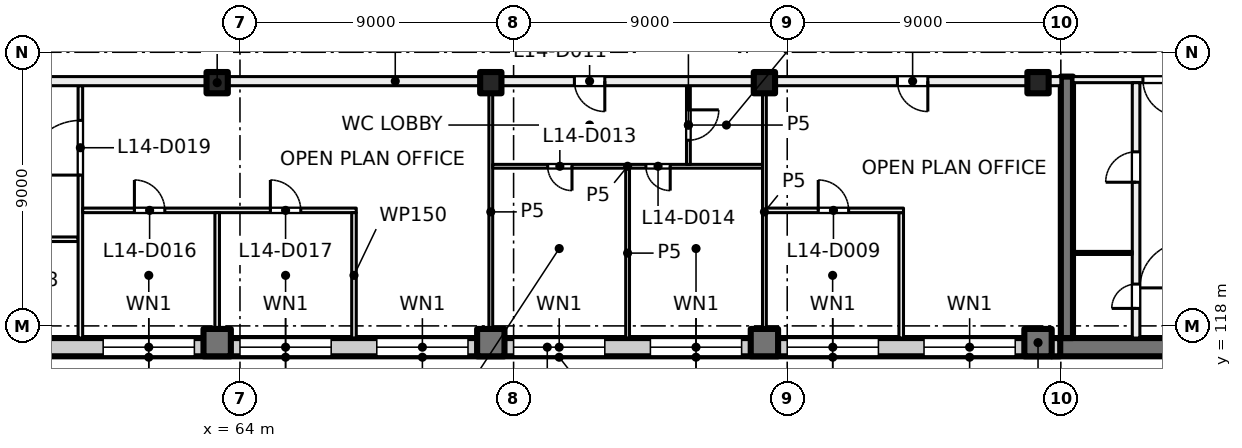
"""IFC4 building model, lengths in metres.
Left out: names, types, materials, properties, quantities, classifications, styles, units other than length and angle.
Written with IfcOpenShell. Run it as: python <this file> out.ifc"""

import sys

from ifc_helpers import new_model, si_unit, direction, frame, frame_2d, origin, origin_2d, place, context, subcontext, project, spatial, rectangle, extrude, element, fill, save


model = new_model("IFC4")
c1 = context("Model", 3, precision=1e-05, world=origin(), true_north=direction((0.0, 1.0)))
c2 = subcontext(c1, "Body", "Model", "MODEL_VIEW")
j1 = project(units=[si_unit("LENGTHUNIT", "METRE"), si_unit("PLANEANGLEUNIT", "RADIAN")], contexts=[c1])
p1 = place(None, origin())
s1 = spatial("IfcSite", under=j1, at=p1, CompositionType="ELEMENT")
p2 = place(p1, origin())
s2 = spatial("IfcBuilding", under=s1, at=p2, CompositionType="ELEMENT")
p3 = place(p2, frame((0.0, 0.0, 63.5)))
s3 = spatial("IfcBuildingStorey", under=s2, at=p3, CompositionType="ELEMENT", Elevation=63.5)
for number, where, z_axis, x_axis in (
    (1, (63.25, 126.0, 0.0), (0.0, 0.0, 1.0), (1.0, 0.0, 0.0)),
    (2, (72.25, 126.0, 0.0), (0.0, 0.0, 1.0), (1.0, 0.0, 0.0)),
    (3, (81.25, 126.0, 0.0), (0.0, 0.0, 1.0), (1.0, 0.0, 0.0)),
    (4, (90.25, 126.0, 0.0), (0.0, 0.0, 1.0), (1.0, 0.0, 0.0)),
):
    element("IfcColumn", number, at=place(p3, frame(where, z_axis=z_axis, x_axis=x_axis)), inside=s3, PredefinedType="COLUMN", context=c2, shape_type="SweptSolid", body=[
        extrude(rectangle(XDim=0.7, YDim=0.7, at=origin_2d()), origin(), (0.0, 0.0, 1.0), 4.0),
    ])
for number, where, z_axis, x_axis in (
    (5, (63.25, 117.45, 0.0), (0.0, 0.0, 1.0), (1.0, 0.0, 0.0)),
    (6, (72.25, 117.45, 0.0), (0.0, 0.0, 1.0), (1.0, 0.0, 0.0)),
    (7, (81.25, 117.45, 0.0), (0.0, 0.0, 1.0), (1.0, 0.0, 0.0)),
    (8, (90.25, 117.45, 0.0), (0.0, 0.0, 1.0), (1.0, 0.0, 0.0)),
):
    element("IfcColumn", number, at=place(p3, frame(where, z_axis=z_axis, x_axis=x_axis)), inside=s3, PredefinedType="COLUMN", context=c2, shape_type="SweptSolid", body=[
        extrude(rectangle(XDim=0.9, YDim=0.9, at=origin_2d()), origin(), (0.0, 0.0, 1.0), 4.0),
    ])
p4 = place(p3, frame((99.6, 117.3, 0.0), z_axis=(0.0, 0.0, 1.0), x_axis=(-1.0, 0.0, 0.0)))
e9 = element("IfcWall", 9, at=p4, inside=s3, PredefinedType="SHEAR", context=c2, shape_type="SweptSolid", body=[
    extrude(rectangle(XDim=8.9, YDim=0.6, at=frame_2d((4.45, 0.0))), origin(), (0.0, 0.0, 1.0), 4.0),
])
p5 = place(p3, frame((91.2, 126.2, 0.0), z_axis=(0.0, 0.0, 1.0), x_axis=(0.0, -1.0, 0.0)))
e10 = element("IfcWall", 10, at=p5, inside=s3, PredefinedType="SHEAR", context=c2, shape_type="SweptSolid", body=[
    extrude(rectangle(XDim=8.6, YDim=0.4, at=frame_2d((4.3, 0.0))), origin(), (0.0, 0.0, 1.0), 4.0),
])
p6 = place(p3, frame((90.98, 117.3, 0.0), z_axis=(0.0, 0.0, 1.0), x_axis=(-1.0, 0.0, 0.0)))
e11 = element("IfcWall", 11, at=p6, inside=s3, PredefinedType="SOLIDWALL", context=c2, shape_type="SweptSolid", body=[
    extrude(rectangle(XDim=33.745, YDim=0.6, at=frame_2d((16.873, 0.0))), origin(), (0.0, 0.0, 1.0), 3.625),
])
p7 = place(p6, frame((1.48, 0.0, 0.9)))
e12 = element("IfcOpeningElement", 12, at=p7, cuts=e11, PredefinedType="OPENING", context=c2, shape_type="SweptSolid", body=[
    extrude(rectangle(XDim=3.0, YDim=2.4, at=frame_2d((1.5, 1.2))), frame((0.0, 0.31, 0.0), z_axis=(0.0, -1.0, 0.0), x_axis=(1.0, 0.0, 0.0)), (0.0, 0.0, 1.0), 0.62),
])
p8 = place(p6, frame((5.98, 0.0, 0.9)))
e13 = element("IfcOpeningElement", 13, at=p8, cuts=e11, PredefinedType="OPENING", context=c2, shape_type="SweptSolid", body=[
    extrude(rectangle(XDim=3.0, YDim=2.4, at=frame_2d((1.5, 1.2))), frame((0.0, 0.31, 0.0), z_axis=(0.0, -1.0, 0.0), x_axis=(1.0, 0.0, 0.0)), (0.0, 0.0, 1.0), 0.62),
])
p9 = place(p6, frame((10.48, 0.0, 0.9)))
e14 = element("IfcOpeningElement", 14, at=p9, cuts=e11, PredefinedType="OPENING", context=c2, shape_type="SweptSolid", body=[
    extrude(rectangle(XDim=3.0, YDim=2.4, at=frame_2d((1.5, 1.2))), frame((0.0, 0.31, 0.0), z_axis=(0.0, -1.0, 0.0), x_axis=(1.0, 0.0, 0.0)), (0.0, 0.0, 1.0), 0.62),
])
p10 = place(p6, frame((14.98, 0.0, 0.9)))
e15 = element("IfcOpeningElement", 15, at=p10, cuts=e11, PredefinedType="OPENING", context=c2, shape_type="SweptSolid", body=[
    extrude(rectangle(XDim=3.0, YDim=2.4, at=frame_2d((1.5, 1.2))), frame((0.0, 0.31, 0.0), z_axis=(0.0, -1.0, 0.0), x_axis=(1.0, 0.0, 0.0)), (0.0, 0.0, 1.0), 0.62),
])
p11 = place(p6, frame((19.48, 0.0, 0.9)))
e16 = element("IfcOpeningElement", 16, at=p11, cuts=e11, PredefinedType="OPENING", context=c2, shape_type="SweptSolid", body=[
    extrude(rectangle(XDim=3.0, YDim=2.4, at=frame_2d((1.5, 1.2))), frame((0.0, 0.31, 0.0), z_axis=(0.0, -1.0, 0.0), x_axis=(1.0, 0.0, 0.0)), (0.0, 0.0, 1.0), 0.62),
])
p12 = place(p6, frame((23.98, 0.0, 0.9)))
e17 = element("IfcOpeningElement", 17, at=p12, cuts=e11, PredefinedType="OPENING", context=c2, shape_type="SweptSolid", body=[
    extrude(rectangle(XDim=3.0, YDim=2.4, at=frame_2d((1.5, 1.2))), frame((0.0, 0.31, 0.0), z_axis=(0.0, -1.0, 0.0), x_axis=(1.0, 0.0, 0.0)), (0.0, 0.0, 1.0), 0.62),
])
p13 = place(p6, frame((28.48, 0.0, 0.9)))
e18 = element("IfcOpeningElement", 18, at=p13, cuts=e11, PredefinedType="OPENING", context=c2, shape_type="SweptSolid", body=[
    extrude(rectangle(XDim=3.0, YDim=2.4, at=frame_2d((1.5, 1.2))), frame((0.0, 0.31, 0.0), z_axis=(0.0, -1.0, 0.0), x_axis=(1.0, 0.0, 0.0)), (0.0, 0.0, 1.0), 0.62),
])
p14 = place(p3, frame((95.2, 126.1, 0.0), z_axis=(0.0, 0.0, 1.0), x_axis=(-1.0, 0.0, 0.0)))
e19 = element("IfcWall", 19, at=p14, inside=s3, PredefinedType="PARTITIONING", context=c2, shape_type="SweptSolid", body=[
    extrude(rectangle(XDim=3.8, YDim=0.2, at=frame_2d((1.9, 0.0))), origin(), (0.0, 0.0, 1.0), 3.625),
])
p15 = place(p14, frame((0.3, 0.0, 0.0)))
e20 = element("IfcOpeningElement", 20, at=p15, cuts=e19, PredefinedType="OPENING", context=c2, shape_type="SweptSolid", body=[
    extrude(rectangle(XDim=1.2, YDim=2.1, at=frame_2d((0.6, 1.05))), frame((0.0, 0.11, 0.0), z_axis=(0.0, -1.0, 0.0), x_axis=(1.0, 0.0, 0.0)), (0.0, 0.0, 1.0), 0.22),
])
p16 = place(p3, frame((93.475, 117.6, 0.0), z_axis=(0.0, 0.0, 1.0), x_axis=(0.0, 1.0, 0.0)))
e21 = element("IfcWall", 21, at=p16, inside=s3, PredefinedType="PARTITIONING", context=c2, shape_type="SweptSolid", body=[
    extrude(rectangle(XDim=8.4, YDim=0.25, at=frame_2d((4.2, 0.0))), origin(), (0.0, 0.0, 1.0), 3.625),
])
p17 = place(p16, frame((5.125, 0.0, 0.0)))
e22 = element("IfcOpeningElement", 22, at=p17, cuts=e21, PredefinedType="OPENING", context=c2, shape_type="SweptSolid", body=[
    extrude(rectangle(XDim=1.0, YDim=2.1, at=frame_2d((0.5, 1.05))), frame((0.0, 0.135, 0.0), z_axis=(0.0, -1.0, 0.0), x_axis=(1.0, 0.0, 0.0)), (0.0, 0.0, 1.0), 0.27),
])
p18 = place(p16, frame((0.975, 0.0, 0.0)))
e23 = element("IfcOpeningElement", 23, at=p18, cuts=e21, PredefinedType="OPENING", context=c2, shape_type="SweptSolid", body=[
    extrude(rectangle(XDim=0.8, YDim=2.1, at=frame_2d((0.4, 1.05))), frame((0.0, 0.135, 0.0), z_axis=(0.0, -1.0, 0.0), x_axis=(1.0, 0.0, 0.0)), (0.0, 0.0, 1.0), 0.27),
])
p19 = place(p3, frame((93.35, 120.4, 0.0), z_axis=(0.0, 0.0, 1.0), x_axis=(-1.0, 0.0, 0.0)))
e24 = element("IfcWall", 24, at=p19, inside=s3, PredefinedType="PARTITIONING", context=c2, shape_type="SweptSolid", body=[
    extrude(rectangle(XDim=1.95, YDim=0.1, at=frame_2d((0.975, 0.0))), origin(), (0.0, 0.0, 1.0), 3.625),
])
p20 = place(p3, frame((54.325, 120.85, 0.0), z_axis=(0.0, 0.0, 1.0), x_axis=(1.0, 0.0, 0.0)))
e25 = element("IfcWall", 25, at=p20, inside=s3, PredefinedType="PARTITIONING", context=c2, shape_type="SweptSolid", body=[
    extrude(rectangle(XDim=4.35, YDim=0.15, at=frame_2d((2.175, 0.0))), origin(), (0.0, 0.0, 1.0), 3.625),
])
p21 = place(p20, frame((1.675, 0.0, 0.0)))
e26 = element("IfcOpeningElement", 26, at=p21, cuts=e25, PredefinedType="OPENING", context=c2, shape_type="SweptSolid", body=[
    extrude(rectangle(XDim=1.0, YDim=2.1, at=frame_2d((0.5, 1.05))), frame((0.0, 0.085, 0.0), z_axis=(0.0, -1.0, 0.0), x_axis=(1.0, 0.0, 0.0)), (0.0, 0.0, 1.0), 0.17),
])
p22 = place(p3, frame((58.75, 117.6, 0.0), z_axis=(0.0, 0.0, 1.0), x_axis=(0.0, 1.0, 0.0)))
e27 = element("IfcWall", 27, at=p22, inside=s3, PredefinedType="PARTITIONING", context=c2, shape_type="SweptSolid", body=[
    extrude(rectangle(XDim=8.3, YDim=0.15, at=frame_2d((4.15, 0.0))), origin(), (0.0, 0.0, 1.0), 3.625),
])
p23 = place(p22, frame((5.36, 0.0, 0.0)))
e28 = element("IfcOpeningElement", 28, at=p23, cuts=e27, PredefinedType="OPENING", context=c2, shape_type="SweptSolid", body=[
    extrude(rectangle(XDim=1.8, YDim=2.1, at=frame_2d((0.9, 1.05))), frame((0.0, 0.085, 0.0), z_axis=(0.0, -1.0, 0.0), x_axis=(1.0, 0.0, 0.0)), (0.0, 0.0, 1.0), 0.17),
])
p24 = place(p3, frame((58.825, 121.8, 0.0), z_axis=(0.0, 0.0, 1.0), x_axis=(1.0, 0.0, 0.0)))
e29 = element("IfcWall", 29, at=p24, inside=s3, PredefinedType="PARTITIONING", context=c2, shape_type="SweptSolid", body=[
    extrude(rectangle(XDim=9.0, YDim=0.15, at=frame_2d((4.5, 0.0))), origin(), (0.0, 0.0, 1.0), 3.625),
])
p25 = place(p24, frame((1.702, 0.0, 0.0)))
e30 = element("IfcOpeningElement", 30, at=p25, cuts=e29, PredefinedType="OPENING", context=c2, shape_type="SweptSolid", body=[
    extrude(rectangle(XDim=1.0, YDim=2.1, at=frame_2d((0.5, 1.05))), frame((0.0, 0.085, 0.0), z_axis=(0.0, -1.0, 0.0), x_axis=(1.0, 0.0, 0.0)), (0.0, 0.0, 1.0), 0.17),
])
p26 = place(p24, frame((6.175, 0.0, 0.0)))
e31 = element("IfcOpeningElement", 31, at=p26, cuts=e29, PredefinedType="OPENING", context=c2, shape_type="SweptSolid", body=[
    extrude(rectangle(XDim=1.0, YDim=2.1, at=frame_2d((0.5, 1.05))), frame((0.0, 0.085, 0.0), z_axis=(0.0, -1.0, 0.0), x_axis=(1.0, 0.0, 0.0)), (0.0, 0.0, 1.0), 0.17),
])
for number, where, z_axis, x_axis in (
    (32, (63.25, 121.725, 0.0), (0.0, 0.0, 1.0), (0.0, -1.0, 0.0)),
    (33, (67.75, 117.6, 0.0), (0.0, 0.0, 1.0), (0.0, 1.0, 0.0)),
):
    element("IfcWall", number, at=place(p3, frame(where, z_axis=z_axis, x_axis=x_axis)), inside=s3, PredefinedType="PARTITIONING", context=c2, shape_type="SweptSolid", body=[
        extrude(rectangle(XDim=4.125, YDim=0.15, at=frame_2d((2.062, 0.0))), origin(), (0.0, 0.0, 1.0), 3.625),
    ])
p27 = place(p3, frame((72.25, 117.6, 0.0), z_axis=(0.0, 0.0, 1.0), x_axis=(0.0, 1.0, 0.0)))
e34 = element("IfcWall", 34, at=p27, inside=s3, PredefinedType="PARTITIONING", context=c2, shape_type="SweptSolid", body=[
    extrude(rectangle(XDim=8.3, YDim=0.125, at=frame_2d((4.15, 0.0))), origin(), (0.0, 0.0, 1.0), 3.625),
])
p28 = place(p3, frame((81.188, 123.25, 0.0), z_axis=(0.0, 0.0, 1.0), x_axis=(-1.0, 0.0, 0.0)))
e35 = element("IfcWall", 35, at=p28, inside=s3, PredefinedType="PARTITIONING", context=c2, shape_type="SweptSolid", body=[
    extrude(rectangle(XDim=8.876, YDim=0.125, at=frame_2d((4.438, 0.0))), origin(), (0.0, 0.0, 1.0), 3.625),
])
p29 = place(p28, frame((6.267, 0.0, 0.0)))
e36 = element("IfcOpeningElement", 36, at=p29, cuts=e35, PredefinedType="OPENING", context=c2, shape_type="SweptSolid", body=[
    extrude(rectangle(XDim=0.8, YDim=2.1, at=frame_2d((0.4, 1.05))), frame((0.0, 0.073, 0.0), z_axis=(0.0, -1.0, 0.0), x_axis=(1.0, 0.0, 0.0)), (0.0, 0.0, 1.0), 0.145),
])
p30 = place(p28, frame((3.037, 0.0, 0.0)))
e37 = element("IfcOpeningElement", 37, at=p30, cuts=e35, PredefinedType="OPENING", context=c2, shape_type="SweptSolid", body=[
    extrude(rectangle(XDim=0.8, YDim=2.1, at=frame_2d((0.4, 1.05))), frame((0.0, 0.073, 0.0), z_axis=(0.0, -1.0, 0.0), x_axis=(1.0, 0.0, 0.0)), (0.0, 0.0, 1.0), 0.145),
])
p31 = place(p3, frame((76.75, 117.6, 0.0), z_axis=(0.0, 0.0, 1.0), x_axis=(0.0, 1.0, 0.0)))
e38 = element("IfcWall", 38, at=p31, inside=s3, PredefinedType="PARTITIONING", context=c2, shape_type="SweptSolid", body=[
    extrude(rectangle(XDim=5.588, YDim=0.125, at=frame_2d((2.794, 0.0))), origin(), (0.0, 0.0, 1.0), 3.625),
])
p32 = place(p3, frame((78.75, 125.9, 0.0), z_axis=(0.0, 0.0, 1.0), x_axis=(0.0, -1.0, 0.0)))
e39 = element("IfcWall", 39, at=p32, inside=s3, PredefinedType="PARTITIONING", context=c2, shape_type="SweptSolid", body=[
    extrude(rectangle(XDim=2.588, YDim=0.125, at=frame_2d((1.294, 0.0))), origin(), (0.0, 0.0, 1.0), 3.625),
])
p33 = place(p32, frame((0.794, 0.0, 0.0)))
e40 = element("IfcOpeningElement", 40, at=p33, cuts=e39, PredefinedType="OPENING", context=c2, shape_type="SweptSolid", body=[
    extrude(rectangle(XDim=1.0, YDim=2.1, at=frame_2d((0.5, 1.05))), frame((0.0, 0.073, 0.0), z_axis=(0.0, -1.0, 0.0), x_axis=(1.0, 0.0, 0.0)), (0.0, 0.0, 1.0), 0.145),
])
p34 = place(p3, frame((81.25, 117.6, 0.0), z_axis=(0.0, 0.0, 1.0), x_axis=(0.0, 1.0, 0.0)))
e41 = element("IfcWall", 41, at=p34, inside=s3, PredefinedType="PARTITIONING", context=c2, shape_type="SweptSolid", body=[
    extrude(rectangle(XDim=8.3, YDim=0.125, at=frame_2d((4.15, 0.0))), origin(), (0.0, 0.0, 1.0), 3.625),
])
p35 = place(p3, frame((85.75, 117.6, 0.0), z_axis=(0.0, 0.0, 1.0), x_axis=(0.0, 1.0, 0.0)))
e42 = element("IfcWall", 42, at=p35, inside=s3, PredefinedType="PARTITIONING", context=c2, shape_type="SweptSolid", body=[
    extrude(rectangle(XDim=4.125, YDim=0.15, at=frame_2d((2.062, 0.0))), origin(), (0.0, 0.0, 1.0), 3.625),
])
p36 = place(p3, frame((81.312, 121.8, 0.0), z_axis=(0.0, 0.0, 1.0), x_axis=(1.0, 0.0, 0.0)))
e43 = element("IfcWall", 43, at=p36, inside=s3, PredefinedType="PARTITIONING", context=c2, shape_type="SweptSolid", body=[
    extrude(rectangle(XDim=4.513, YDim=0.15, at=frame_2d((2.256, 0.0))), origin(), (0.0, 0.0, 1.0), 3.625),
])
p37 = place(p36, frame((1.709, 0.0, 0.0)))
e44 = element("IfcOpeningElement", 44, at=p37, cuts=e43, PredefinedType="OPENING", context=c2, shape_type="SweptSolid", body=[
    extrude(rectangle(XDim=1.0, YDim=2.1, at=frame_2d((0.5, 1.05))), frame((0.0, 0.085, 0.0), z_axis=(0.0, -1.0, 0.0), x_axis=(1.0, 0.0, 0.0)), (0.0, 0.0, 1.0), 0.17),
])
p38 = place(p3, frame((91.0, 126.05, 0.0), z_axis=(0.0, 0.0, 1.0), x_axis=(-1.0, 0.0, 0.0)))
e45 = element("IfcWall", 45, at=p38, inside=s3, PredefinedType="PARTITIONING", context=c2, shape_type="SweptSolid", body=[
    extrude(rectangle(XDim=43.785, YDim=0.3, at=frame_2d((21.893, 0.0))), origin(), (0.0, 0.0, 1.0), 3.625),
])
p39 = place(p38, frame((4.375, 0.0, 0.0)))
e46 = element("IfcOpeningElement", 46, at=p39, cuts=e45, PredefinedType="OPENING", context=c2, shape_type="SweptSolid", body=[
    extrude(rectangle(XDim=1.0, YDim=2.1, at=frame_2d((0.5, 1.05))), frame((0.0, 0.16, 0.0), z_axis=(0.0, -1.0, 0.0), x_axis=(1.0, 0.0, 0.0)), (0.0, 0.0, 1.0), 0.32),
])
p40 = place(p38, frame((15.0, 0.0, 0.0)))
e47 = element("IfcOpeningElement", 47, at=p40, cuts=e45, PredefinedType="OPENING", context=c2, shape_type="SweptSolid", body=[
    extrude(rectangle(XDim=1.0, YDim=2.1, at=frame_2d((0.5, 1.05))), frame((0.0, 0.16, 0.0), z_axis=(0.0, -1.0, 0.0), x_axis=(1.0, 0.0, 0.0)), (0.0, 0.0, 1.0), 0.32),
])
p41 = place(p38, frame((34.0, 0.0, 0.0)))
e48 = element("IfcOpeningElement", 48, at=p41, cuts=e45, PredefinedType="OPENING", context=c2, shape_type="SweptSolid", body=[
    extrude(rectangle(XDim=1.0, YDim=2.1, at=frame_2d((0.5, 1.05))), frame((0.0, 0.16, 0.0), z_axis=(0.0, -1.0, 0.0), x_axis=(1.0, 0.0, 0.0)), (0.0, 0.0, 1.0), 0.32),
])
p42 = place(p38, frame((39.296, 0.0, 0.0)))
e49 = element("IfcOpeningElement", 49, at=p42, cuts=e45, PredefinedType="OPENING", context=c2, shape_type="SweptSolid", body=[
    extrude(rectangle(XDim=1.8, YDim=2.1, at=frame_2d((0.9, 1.05))), frame((0.0, 0.16, 0.0), z_axis=(0.0, -1.0, 0.0), x_axis=(1.0, 0.0, 0.0)), (0.0, 0.0, 1.0), 0.32),
])
p43 = place(p7, origin())
e50 = element("IfcWindow", 50, at=p43, inside=s3, PartitioningType="SINGLE_PANEL", PredefinedType="WINDOW", context=c2, shape_type="SweptSolid", body=[
    extrude(rectangle(XDim=3.0, YDim=2.4, at=frame_2d((1.5, 1.2))), frame((0.0, 0.03, 0.0), z_axis=(0.0, -1.0, 0.0), x_axis=(1.0, 0.0, 0.0)), (0.0, 0.0, 1.0), 0.06),
])
fill(e12, e50)
p44 = place(p8, origin())
e51 = element("IfcWindow", 51, at=p44, inside=s3, PartitioningType="SINGLE_PANEL", PredefinedType="WINDOW", context=c2, shape_type="SweptSolid", body=[
    extrude(rectangle(XDim=3.0, YDim=2.4, at=frame_2d((1.5, 1.2))), frame((0.0, 0.03, 0.0), z_axis=(0.0, -1.0, 0.0), x_axis=(1.0, 0.0, 0.0)), (0.0, 0.0, 1.0), 0.06),
])
fill(e13, e51)
p45 = place(p9, origin())
e52 = element("IfcWindow", 52, at=p45, inside=s3, PartitioningType="SINGLE_PANEL", PredefinedType="WINDOW", context=c2, shape_type="SweptSolid", body=[
    extrude(rectangle(XDim=3.0, YDim=2.4, at=frame_2d((1.5, 1.2))), frame((0.0, 0.03, 0.0), z_axis=(0.0, -1.0, 0.0), x_axis=(1.0, 0.0, 0.0)), (0.0, 0.0, 1.0), 0.06),
])
fill(e14, e52)
p46 = place(p10, origin())
e53 = element("IfcWindow", 53, at=p46, inside=s3, PartitioningType="SINGLE_PANEL", PredefinedType="WINDOW", context=c2, shape_type="SweptSolid", body=[
    extrude(rectangle(XDim=3.0, YDim=2.4, at=frame_2d((1.5, 1.2))), frame((0.0, 0.03, 0.0), z_axis=(0.0, -1.0, 0.0), x_axis=(1.0, 0.0, 0.0)), (0.0, 0.0, 1.0), 0.06),
])
fill(e15, e53)
p47 = place(p11, origin())
e54 = element("IfcWindow", 54, at=p47, inside=s3, PartitioningType="SINGLE_PANEL", PredefinedType="WINDOW", context=c2, shape_type="SweptSolid", body=[
    extrude(rectangle(XDim=3.0, YDim=2.4, at=frame_2d((1.5, 1.2))), frame((0.0, 0.03, 0.0), z_axis=(0.0, -1.0, 0.0), x_axis=(1.0, 0.0, 0.0)), (0.0, 0.0, 1.0), 0.06),
])
fill(e16, e54)
p48 = place(p12, origin())
e55 = element("IfcWindow", 55, at=p48, inside=s3, PartitioningType="SINGLE_PANEL", PredefinedType="WINDOW", context=c2, shape_type="SweptSolid", body=[
    extrude(rectangle(XDim=3.0, YDim=2.4, at=frame_2d((1.5, 1.2))), frame((0.0, 0.03, 0.0), z_axis=(0.0, -1.0, 0.0), x_axis=(1.0, 0.0, 0.0)), (0.0, 0.0, 1.0), 0.06),
])
fill(e17, e55)
p49 = place(p13, origin())
e56 = element("IfcWindow", 56, at=p49, inside=s3, PartitioningType="SINGLE_PANEL", PredefinedType="WINDOW", context=c2, shape_type="SweptSolid", body=[
    extrude(rectangle(XDim=3.0, YDim=2.4, at=frame_2d((1.5, 1.2))), frame((0.0, 0.03, 0.0), z_axis=(0.0, -1.0, 0.0), x_axis=(1.0, 0.0, 0.0)), (0.0, 0.0, 1.0), 0.06),
])
fill(e18, e56)
p50 = place(p15, origin())
e57 = element("IfcDoor", 57, at=p50, inside=s3, OperationType="DOUBLE_DOOR_SINGLE_SWING", PredefinedType="DOOR", context=c2, shape_type="SweptSolid", body=[
    extrude(rectangle(XDim=1.2, YDim=2.1, at=frame_2d((0.6, 1.05))), frame((0.0, 0.025, 0.0), z_axis=(0.0, -1.0, 0.0), x_axis=(1.0, 0.0, 0.0)), (0.0, 0.0, 1.0), 0.05),
])
fill(e20, e57)
p51 = place(p17, origin())
e58 = element("IfcDoor", 58, at=p51, inside=s3, OperationType="SINGLE_SWING_LEFT", PredefinedType="DOOR", context=c2, shape_type="SweptSolid", body=[
    extrude(rectangle(XDim=1.0, YDim=2.1, at=frame_2d((0.5, 1.05))), frame((0.0, 0.025, 0.0), z_axis=(0.0, -1.0, 0.0), x_axis=(1.0, 0.0, 0.0)), (0.0, 0.0, 1.0), 0.05),
])
fill(e22, e58)
p52 = place(p18, origin())
e59 = element("IfcDoor", 59, at=p52, inside=s3, OperationType="SINGLE_SWING_RIGHT", PredefinedType="DOOR", context=c2, shape_type="SweptSolid", body=[
    extrude(rectangle(XDim=0.8, YDim=2.1, at=frame_2d((0.4, 1.05))), frame((0.0, 0.025, 0.0), z_axis=(0.0, -1.0, 0.0), x_axis=(1.0, 0.0, 0.0)), (0.0, 0.0, 1.0), 0.05),
])
fill(e23, e59)
p53 = place(p37, origin())
e60 = element("IfcDoor", 60, at=p53, inside=s3, OperationType="SINGLE_SWING_LEFT", PredefinedType="DOOR", context=c2, shape_type="SweptSolid", body=[
    extrude(rectangle(XDim=1.0, YDim=2.1, at=frame_2d((0.5, 1.05))), frame((0.0, 0.025, 0.0), z_axis=(0.0, -1.0, 0.0), x_axis=(1.0, 0.0, 0.0)), (0.0, 0.0, 1.0), 0.05),
])
fill(e44, e60)
p54 = place(p39, origin())
e61 = element("IfcDoor", 61, at=p54, inside=s3, OperationType="SINGLE_SWING_LEFT", PredefinedType="DOOR", context=c2, shape_type="SweptSolid", body=[
    extrude(rectangle(XDim=1.0, YDim=2.1, at=frame_2d((0.5, 1.05))), frame((0.0, 0.025, 0.0), z_axis=(0.0, -1.0, 0.0), x_axis=(1.0, 0.0, 0.0)), (0.0, 0.0, 1.0), 0.05),
])
fill(e46, e61)
p55 = place(p40, origin())
e62 = element("IfcDoor", 62, at=p55, inside=s3, OperationType="SINGLE_SWING_LEFT", PredefinedType="DOOR", context=c2, shape_type="SweptSolid", body=[
    extrude(rectangle(XDim=1.0, YDim=2.1, at=frame_2d((0.5, 1.05))), frame((0.0, 0.025, 0.0), z_axis=(0.0, -1.0, 0.0), x_axis=(1.0, 0.0, 0.0)), (0.0, 0.0, 1.0), 0.05),
])
fill(e47, e62)
p56 = place(p33, origin())
e63 = element("IfcDoor", 63, at=p56, inside=s3, OperationType="SINGLE_SWING_RIGHT", PredefinedType="DOOR", context=c2, shape_type="SweptSolid", body=[
    extrude(rectangle(XDim=1.0, YDim=2.1, at=frame_2d((0.5, 1.05))), frame((0.0, 0.025, 0.0), z_axis=(0.0, -1.0, 0.0), x_axis=(1.0, 0.0, 0.0)), (0.0, 0.0, 1.0), 0.05),
])
fill(e40, e63)
p57 = place(p29, origin())
e64 = element("IfcDoor", 64, at=p57, inside=s3, OperationType="SINGLE_SWING_RIGHT", PredefinedType="DOOR", context=c2, shape_type="SweptSolid", body=[
    extrude(rectangle(XDim=0.8, YDim=2.1, at=frame_2d((0.4, 1.05))), frame((0.0, 0.025, 0.0), z_axis=(0.0, -1.0, 0.0), x_axis=(1.0, 0.0, 0.0)), (0.0, 0.0, 1.0), 0.05),
])
fill(e36, e64)
p58 = place(p30, origin())
e65 = element("IfcDoor", 65, at=p58, inside=s3, OperationType="SINGLE_SWING_LEFT", PredefinedType="DOOR", context=c2, shape_type="SweptSolid", body=[
    extrude(rectangle(XDim=0.8, YDim=2.1, at=frame_2d((0.4, 1.05))), frame((0.0, 0.025, 0.0), z_axis=(0.0, -1.0, 0.0), x_axis=(1.0, 0.0, 0.0)), (0.0, 0.0, 1.0), 0.05),
])
fill(e37, e65)
p59 = place(p25, origin())
e66 = element("IfcDoor", 66, at=p59, inside=s3, OperationType="SINGLE_SWING_LEFT", PredefinedType="DOOR", context=c2, shape_type="SweptSolid", body=[
    extrude(rectangle(XDim=1.0, YDim=2.1, at=frame_2d((0.5, 1.05))), frame((0.0, 0.025, 0.0), z_axis=(0.0, -1.0, 0.0), x_axis=(1.0, 0.0, 0.0)), (0.0, 0.0, 1.0), 0.05),
])
fill(e30, e66)
p60 = place(p26, origin())
e67 = element("IfcDoor", 67, at=p60, inside=s3, OperationType="SINGLE_SWING_RIGHT", PredefinedType="DOOR", context=c2, shape_type="SweptSolid", body=[
    extrude(rectangle(XDim=1.0, YDim=2.1, at=frame_2d((0.5, 1.05))), frame((0.0, 0.025, 0.0), z_axis=(0.0, -1.0, 0.0), x_axis=(1.0, 0.0, 0.0)), (0.0, 0.0, 1.0), 0.05),
])
fill(e31, e67)
p61 = place(p23, origin())
e68 = element("IfcDoor", 68, at=p61, inside=s3, OperationType="DOUBLE_DOOR_SINGLE_SWING", PredefinedType="DOOR", context=c2, shape_type="SweptSolid", body=[
    extrude(rectangle(XDim=1.8, YDim=2.1, at=frame_2d((0.9, 1.05))), frame((0.0, 0.025, 0.0), z_axis=(0.0, -1.0, 0.0), x_axis=(1.0, 0.0, 0.0)), (0.0, 0.0, 1.0), 0.05),
])
fill(e28, e68)
save(model, sys.argv[1])
